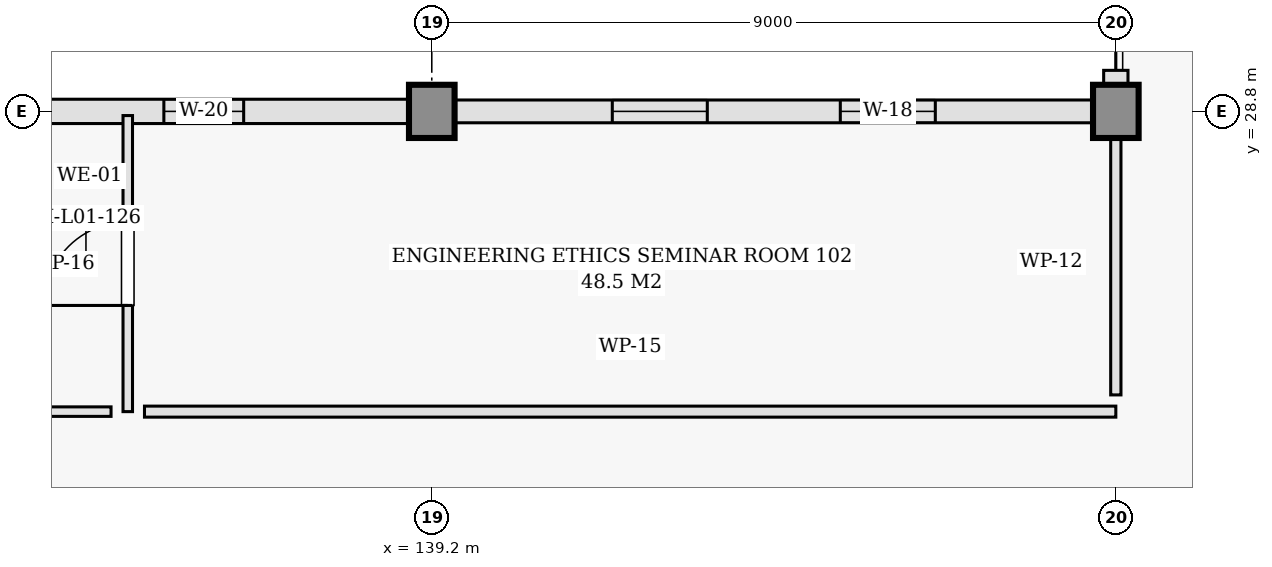
"""IFC4 building model, lengths in metres.
Left out: names, types, materials, properties, quantities, classifications, styles, units other than length and angle.
Written with IfcOpenShell. Run it as: python <this file> out.ifc"""

import sys

from ifc_helpers import new_model, si_unit, direction, frame, frame_2d, origin, origin_2d, place, context, subcontext, project, spatial, rectangle, extrude, element, fill, save


model = new_model("IFC4")
c1 = context("Model", 3, precision=1e-05, world=origin(), true_north=direction((0.0, 1.0)))
c2 = subcontext(c1, "Body", "Model", "MODEL_VIEW")
j1 = project(units=[si_unit("LENGTHUNIT", "METRE"), si_unit("PLANEANGLEUNIT", "RADIAN")], contexts=[c1])
p1 = place(None, origin())
s1 = spatial("IfcSite", under=j1, at=p1, CompositionType="ELEMENT")
p2 = place(p1, origin())
s2 = spatial("IfcBuilding", under=s1, at=p2, CompositionType="ELEMENT")
p3 = place(p2, frame((0.0, 0.0, 4.8)))
s3 = spatial("IfcBuildingStorey", under=s2, at=p3, CompositionType="ELEMENT", Elevation=4.8)
for number, where, z_axis, x_axis in (
    (1, (139.2, 28.8, 0.0), (0.0, 0.0, 1.0), (1.0, 0.0, 0.0)),
    (2, (148.2, 28.8, 0.0), (0.0, 0.0, 1.0), (1.0, 0.0, 0.0)),
):
    element("IfcColumn", number, at=place(p3, frame(where, z_axis=z_axis, x_axis=x_axis)), inside=s3, PredefinedType="COLUMN", context=c2, shape_type="SweptSolid", body=[
        extrude(rectangle(XDim=0.7, YDim=0.7, at=origin_2d()), origin(), (0.0, 0.0, 1.0), 4.8),
    ])
p4 = place(p3, frame((148.2, 29.34, 0.0), z_axis=(0.0, 0.0, 1.0), x_axis=(0.0, -1.0, 0.0)))
e3 = element("IfcWall", 3, at=p4, inside=s3, PredefinedType="SOLIDWALL", context=c2, shape_type="SweptSolid", body=[
    extrude(rectangle(XDim=0.388, YDim=0.32, at=frame_2d((0.194, 0.0))), origin(), (0.0, 0.0, 1.0), 3.665),
])
p5 = place(p3, frame((148.2, 28.8, 0.0), z_axis=(0.0, 0.0, 1.0), x_axis=(-1.0, 0.0, 0.0)))
e4 = element("IfcWall", 4, at=p5, inside=s3, PredefinedType="SOLIDWALL", context=c2, shape_type="SweptSolid", body=[
    extrude(rectangle(XDim=9.0, YDim=0.3, at=frame_2d((4.5, 0.0))), origin(), (0.0, 0.0, 1.0), 3.665),
])
p6 = place(p5, frame((2.375, 0.0, 0.9)))
e5 = element("IfcOpeningElement", 5, at=p6, cuts=e4, PredefinedType="OPENING", context=c2, shape_type="SweptSolid", body=[
    extrude(rectangle(XDim=1.25, YDim=1.5, at=frame_2d((0.625, 0.75))), frame((0.0, 0.16, 0.0), z_axis=(0.0, -1.0, 0.0), x_axis=(1.0, 0.0, 0.0)), (0.0, 0.0, 1.0), 0.32),
])
p7 = place(p5, frame((5.375, 0.0, 0.9)))
e6 = element("IfcOpeningElement", 6, at=p7, cuts=e4, PredefinedType="OPENING", context=c2, shape_type="SweptSolid", body=[
    extrude(rectangle(XDim=1.25, YDim=1.5, at=frame_2d((0.625, 0.75))), frame((0.0, 0.16, 0.0), z_axis=(0.0, -1.0, 0.0), x_axis=(1.0, 0.0, 0.0)), (0.0, 0.0, 1.0), 0.32),
])
p8 = place(p3, frame((139.2, 28.8, 0.0), z_axis=(0.0, 0.0, 1.0), x_axis=(-1.0, 0.0, 0.0)))
e7 = element("IfcWall", 7, at=p8, inside=s3, PredefinedType="SOLIDWALL", context=c2, shape_type="SweptSolid", body=[
    extrude(rectangle(XDim=9.0, YDim=0.32, at=frame_2d((4.5, 0.0))), origin(), (0.0, 0.0, 1.0), 3.665),
])
p9 = place(p8, frame((2.475, 0.0, 0.9)))
e8 = element("IfcOpeningElement", 8, at=p9, cuts=e7, PredefinedType="OPENING", context=c2, shape_type="SweptSolid", body=[
    extrude(rectangle(XDim=1.05, YDim=1.4, at=frame_2d((0.525, 0.7))), frame((0.0, 0.17, 0.0), z_axis=(0.0, -1.0, 0.0), x_axis=(1.0, 0.0, 0.0)), (0.0, 0.0, 1.0), 0.34),
])
p10 = place(p8, frame((5.475, 0.0, 0.9)))
e9 = element("IfcOpeningElement", 9, at=p10, cuts=e7, PredefinedType="OPENING", context=c2, shape_type="SweptSolid", body=[
    extrude(rectangle(XDim=1.05, YDim=1.4, at=frame_2d((0.525, 0.7))), frame((0.0, 0.17, 0.0), z_axis=(0.0, -1.0, 0.0), x_axis=(1.0, 0.0, 0.0)), (0.0, 0.0, 1.0), 0.34),
])
p11 = place(p3, frame((135.2, 24.85, 0.0), z_axis=(0.0, 0.0, 1.0), x_axis=(0.0, 1.0, 0.0)))
e10 = element("IfcWall", 10, at=p11, inside=s3, PredefinedType="PARTITIONING", context=c2, shape_type="SweptSolid", body=[
    extrude(rectangle(XDim=3.895, YDim=0.125, at=frame_2d((1.948, 0.0))), origin(), (0.0, 0.0, 1.0), 3.665),
])
p12 = place(p11, frame((1.397, 0.0, 0.0)))
e11 = element("IfcOpeningElement", 11, at=p12, cuts=e10, PredefinedType="OPENING", context=c2, shape_type="SweptSolid", body=[
    extrude(rectangle(XDim=1.1, YDim=2.15, at=frame_2d((0.55, 1.075))), frame((0.0, 0.073, 0.0), z_axis=(0.0, -1.0, 0.0), x_axis=(1.0, 0.0, 0.0)), (0.0, 0.0, 1.0), 0.145),
])
p13 = place(p3, frame((135.42, 24.85, 0.0), z_axis=(0.0, 0.0, 1.0), x_axis=(1.0, 0.0, 0.0)))
e12 = element("IfcWall", 12, at=p13, inside=s3, PredefinedType="PARTITIONING", context=c2, shape_type="SweptSolid", body=[
    extrude(rectangle(XDim=12.78, YDim=0.145, at=frame_2d((6.39, 0.0))), origin(), (0.0, 0.0, 1.0), 3.815),
])
p14 = place(p3, frame((148.2, 25.07, 0.0), z_axis=(0.0, 0.0, 1.0), x_axis=(0.0, 1.0, 0.0)))
e13 = element("IfcWall", 13, at=p14, inside=s3, PredefinedType="PARTITIONING", context=c2, shape_type="SweptSolid", body=[
    extrude(rectangle(XDim=3.49, YDim=0.135, at=frame_2d((1.745, 0.0))), origin(), (0.0, 0.0, 1.0), 3.815),
])
p15 = place(p3, frame((121.6, 24.85, 0.0), z_axis=(0.0, 0.0, 1.0), x_axis=(1.0, 0.0, 0.0)))
e14 = element("IfcWall", 14, at=p15, inside=s3, PredefinedType="PARTITIONING", context=c2, shape_type="SweptSolid", body=[
    extrude(rectangle(XDim=13.38, YDim=0.125, at=frame_2d((6.69, 0.0))), origin(), (0.0, 0.0, 1.0), 4.48),
])
p16 = place(p15, frame((6.14, 0.0, 0.0)))
e15 = element("IfcOpeningElement", 15, at=p16, cuts=e14, PredefinedType="OPENING", context=c2, shape_type="SweptSolid", body=[
    extrude(rectangle(XDim=1.1, YDim=2.15, at=frame_2d((0.55, 1.075))), frame((0.0, 0.073, 0.0), z_axis=(0.0, -1.0, 0.0), x_axis=(1.0, 0.0, 0.0)), (0.0, 0.0, 1.0), 0.145),
])
p17 = place(p6, origin())
e16 = element("IfcWindow", 16, at=p17, inside=s3, PartitioningType="DOUBLE_PANEL_VERTICAL", PredefinedType="WINDOW", context=c2, shape_type="SweptSolid", body=[
    extrude(rectangle(XDim=1.25, YDim=1.5, at=frame_2d((0.625, 0.75))), frame((0.0, 0.03, 0.0), z_axis=(0.0, -1.0, 0.0), x_axis=(1.0, 0.0, 0.0)), (0.0, 0.0, 1.0), 0.06),
])
fill(e5, e16)
p18 = place(p7, origin())
e17 = element("IfcWindow", 17, at=p18, inside=s3, PartitioningType="DOUBLE_PANEL_VERTICAL", PredefinedType="WINDOW", context=c2, shape_type="SweptSolid", body=[
    extrude(rectangle(XDim=1.25, YDim=1.5, at=frame_2d((0.625, 0.75))), frame((0.0, 0.03, 0.0), z_axis=(0.0, -1.0, 0.0), x_axis=(1.0, 0.0, 0.0)), (0.0, 0.0, 1.0), 0.06),
])
fill(e6, e17)
p19 = place(p9, origin())
e18 = element("IfcWindow", 18, at=p19, inside=s3, PartitioningType="DOUBLE_PANEL_VERTICAL", PredefinedType="WINDOW", context=c2, shape_type="SweptSolid", body=[
    extrude(rectangle(XDim=1.05, YDim=1.4, at=frame_2d((0.525, 0.7))), frame((0.0, 0.03, 0.0), z_axis=(0.0, -1.0, 0.0), x_axis=(1.0, 0.0, 0.0)), (0.0, 0.0, 1.0), 0.06),
])
fill(e8, e18)
p20 = place(p12, origin())
e19 = element("IfcDoor", 19, at=p20, inside=s3, OperationType="SINGLE_SWING_LEFT", PredefinedType="DOOR", context=c2, shape_type="SweptSolid", body=[
    extrude(rectangle(XDim=1.1, YDim=2.15, at=frame_2d((0.55, 1.075))), frame((0.0, 0.025, 0.0), z_axis=(0.0, -1.0, 0.0), x_axis=(1.0, 0.0, 0.0)), (0.0, 0.0, 1.0), 0.05),
])
fill(e11, e19)
save(model, sys.argv[1])
